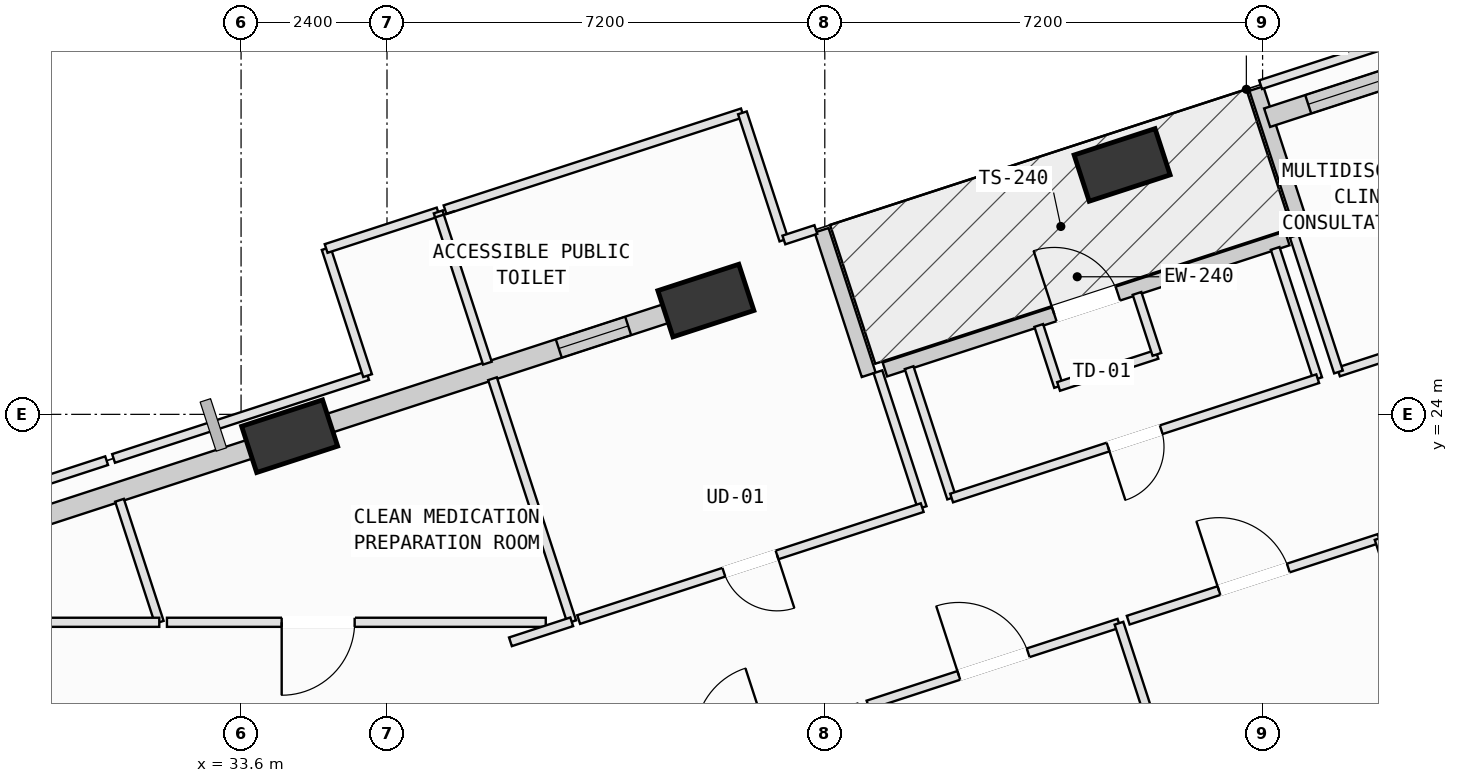
"""IFC4 building model, lengths in metres.
Left out: names, types, materials, properties, quantities, classifications, styles, units other than length and angle.
Written with IfcOpenShell. Run it as: python <this file> out.ifc"""

import sys

from ifc_helpers import new_model, si_unit, direction, frame, frame_2d, origin, origin_2d, place, context, subcontext, project, spatial, rectangle, extrude, element, fill, save


model = new_model("IFC4")
c1 = context("Model", 3, precision=1e-05, world=origin(), true_north=direction((0.0, 1.0)))
c2 = subcontext(c1, "Body", "Model", "MODEL_VIEW")
j1 = project(units=[si_unit("LENGTHUNIT", "METRE"), si_unit("PLANEANGLEUNIT", "RADIAN")], contexts=[c1])
p1 = place(None, origin())
s1 = spatial("IfcSite", under=j1, at=p1, CompositionType="ELEMENT")
p2 = place(p1, origin())
s2 = spatial("IfcBuilding", under=s1, at=p2, CompositionType="ELEMENT")
p3 = place(p2, frame((0.0, 0.0, 100.4)))
s3 = spatial("IfcBuildingStorey", under=s2, at=p3, CompositionType="ELEMENT", Elevation=100.4)
p4 = place(p3, frame((48.09, 28.102, 0.002), z_axis=(-0.014146332364, 0.059817034695, 0.998109114096), x_axis=(-0.854089030519, -0.519778031459, 0.019045365861)))
e1 = element("IfcColumn", 1, at=p4, inside=s3, PredefinedType="COLUMN", context=c2, shape_type="SweptSolid", body=[
    extrude(rectangle(XDim=1.4, YDim=0.8, at=origin_2d()), origin(), (0.0, 0.0, 1.0), 4.004),
])
p5 = place(p3, frame((41.244, 25.871, 0.002), z_axis=(-0.004701608145, 0.03162900025, 0.999488619857), x_axis=(-0.894918501832, -0.446119614033, 0.009907827933)))
e2 = element("IfcColumn", 2, at=p5, inside=s3, PredefinedType="COLUMN", context=c2, shape_type="SweptSolid", body=[
    extrude(rectangle(XDim=1.4, YDim=0.8, at=origin_2d()), origin(), (0.0, 0.0, 1.0), 3.998),
])
p6 = place(p3, frame((34.399, 23.64, 0.002), z_axis=(0.004765023776, 0.003359952663, 0.999983002489), x_axis=(-0.801131940554, 0.598485045893, 0.001806562028)))
e3 = element("IfcColumn", 3, at=p6, inside=s3, PredefinedType="COLUMN", context=c2, shape_type="SweptSolid", body=[
    extrude(rectangle(XDim=1.4, YDim=0.8, at=origin_2d()), origin(), (0.0, 0.0, 1.0), 3.996),
])
p7 = place(p3, frame((44.188, 24.738, 0.0), z_axis=(0.0, 0.0, 1.0), x_axis=(0.950787586952, 0.309843451597, 0.0)))
e4 = element("IfcWall", 4, at=p7, inside=s3, PredefinedType="SOLIDWALL", context=c2, shape_type="SweptSolid", body=[
    extrude(rectangle(XDim=6.96, YDim=0.24, at=frame_2d((3.48, 0.0))), origin(), (0.0, 0.0, 1.0), 2.945),
])
p8 = place(p7, frame((2.93, 0.0, 0.0)))
e5 = element("IfcOpeningElement", 5, at=p8, cuts=e4, PredefinedType="OPENING", context=c2, shape_type="SweptSolid", body=[
    extrude(rectangle(XDim=1.1, YDim=2.15, at=frame_2d((0.55, 1.075))), frame((0.0, 0.13, 0.0), z_axis=(0.0, -1.0, 0.0), x_axis=(1.0, 0.0, 0.0)), (0.0, 0.0, 1.0), 0.26),
])
for number, where, z_axis, x_axis in (
    (6, (43.148, 27.028, 0.0), (0.0, 0.0, 1.0), (0.31, -0.951, 0.0)),
    (7, (51.072, 26.981, 0.0), (0.0, 0.0, 1.0), (-0.31, 0.951, 0.0)),
):
    element("IfcWall", number, at=place(p3, frame(where, z_axis=z_axis, x_axis=x_axis)), inside=s3, PredefinedType="SOLIDWALL", context=c2, shape_type="SweptSolid", body=[
        extrude(rectangle(XDim=2.5, YDim=0.24, at=frame_2d((1.25, 0.0))), origin(), (0.0, 0.0, 1.0), 3.165),
    ])
p9 = place(p3, frame((50.475, 28.879, 0.0), z_axis=(0.0, 0.0, 1.0), x_axis=(0.950788010737, 0.309842151164, 0.0)))
e8 = element("IfcWall", 8, at=p9, inside=s3, PredefinedType="SOLIDWALL", context=c2, shape_type="SweptSolid", body=[
    extrude(rectangle(XDim=3.387, YDim=0.32, at=frame_2d((1.694, 0.0))), origin(), (0.0, 0.0, 1.0), 2.945),
])
p10 = place(p9, frame((0.711, 0.0, 0.75)))
e9 = element("IfcOpeningElement", 9, at=p10, cuts=e8, PredefinedType="OPENING", context=c2, shape_type="SweptSolid", body=[
    extrude(rectangle(XDim=1.8, YDim=2.05, at=frame_2d((0.9, 1.025))), frame((0.0, 0.17, 0.0), z_axis=(0.0, -1.0, 0.0), x_axis=(1.0, 0.0, 0.0)), (0.0, 0.0, 1.0), 0.34),
])
p11 = place(p3, frame((34.881, 23.798, 0.0), z_axis=(0.0, 0.0, 1.0), x_axis=(0.950780703693, 0.309864572813, 0.0)))
e10 = element("IfcWall", 10, at=p11, inside=s3, PredefinedType="SOLIDWALL", context=c2, shape_type="SweptSolid", body=[
    extrude(rectangle(XDim=6.211, YDim=0.32, at=frame_2d((3.105, 0.0))), origin(), (0.0, 0.0, 1.0), 3.165),
])
p12 = place(p11, frame((4.148, 0.0, 0.75)))
e11 = element("IfcOpeningElement", 11, at=p12, cuts=e10, PredefinedType="OPENING", context=c2, shape_type="SweptSolid", body=[
    extrude(rectangle(XDim=1.2, YDim=1.75, at=frame_2d((0.6, 0.875))), frame((0.0, 0.17, 0.0), z_axis=(0.0, -1.0, 0.0), x_axis=(1.0, 0.0, 0.0)), (0.0, 0.0, 1.0), 0.34),
])
p13 = place(p3, frame((28.271, 21.643, 0.0), z_axis=(0.0, 0.0, 1.0), x_axis=(0.950787828702, 0.309842709763, 0.0)))
e12 = element("IfcWall", 12, at=p13, inside=s3, PredefinedType="SOLIDWALL", context=c2, shape_type="SweptSolid", body=[
    extrude(rectangle(XDim=5.96, YDim=0.32, at=frame_2d((2.98, 0.0))), origin(), (0.0, 0.0, 1.0), 3.165),
])
p14 = place(p3, frame((43.911, 19.22, 0.0), z_axis=(0.0, 0.0, 1.0), x_axis=(0.950787843692, 0.309842663762, 0.0)))
e13 = element("IfcWall", 13, at=p14, inside=s3, PredefinedType="PARTITIONING", context=c2, shape_type="SweptSolid", body=[
    extrude(rectangle(XDim=4.341, YDim=0.15, at=frame_2d((2.17, 0.0))), origin(), (0.0, 0.0, 1.0), 3.78),
])
p15 = place(p14, frame((1.57, 0.0, 0.0)))
e14 = element("IfcOpeningElement", 14, at=p15, cuts=e13, PredefinedType="OPENING", context=c2, shape_type="SweptSolid", body=[
    extrude(rectangle(XDim=1.2, YDim=2.15, at=frame_2d((0.6, 1.075))), frame((0.0, 0.085, 0.0), z_axis=(0.0, -1.0, 0.0), x_axis=(1.0, 0.0, 0.0)), (0.0, 0.0, 1.0), 0.17),
])
p16 = place(p3, frame((48.038, 20.565, 0.0), z_axis=(0.0, 0.0, 1.0), x_axis=(0.309813403984, -0.950797378368, 0.0)))
e15 = element("IfcWall", 15, at=p16, inside=s3, PredefinedType="PARTITIONING", context=c2, shape_type="SweptSolid", body=[
    extrude(rectangle(XDim=13.615, YDim=0.15, at=frame_2d((6.807, 0.0))), origin(), (0.0, 0.0, 1.0), 3.78),
])
p17 = place(p3, frame((48.19, 20.615, 0.0), z_axis=(0.0, 0.0, 1.0), x_axis=(0.950827127497, 0.309722090939, 0.0)))
e16 = element("IfcWall", 16, at=p17, inside=s3, PredefinedType="PARTITIONING", context=c2, shape_type="SweptSolid", body=[
    extrude(rectangle(XDim=4.339, YDim=0.15, at=frame_2d((2.17, 0.0))), origin(), (0.0, 0.0, 1.0), 3.78),
])
p18 = place(p17, frame((1.57, 0.0, 0.0)))
e17 = element("IfcOpeningElement", 17, at=p18, cuts=e16, PredefinedType="OPENING", context=c2, shape_type="SweptSolid", body=[
    extrude(rectangle(XDim=1.2, YDim=2.15, at=frame_2d((0.6, 1.075))), frame((0.0, 0.085, 0.0), z_axis=(0.0, -1.0, 0.0), x_axis=(1.0, 0.0, 0.0)), (0.0, 0.0, 1.0), 0.17),
])
p19 = place(p3, frame((52.316, 21.959, 0.0), z_axis=(0.0, 0.0, 1.0), x_axis=(0.309872962478, -0.950777969415, 0.0)))
e18 = element("IfcWall", 18, at=p19, inside=s3, PredefinedType="PARTITIONING", context=c2, shape_type="SweptSolid", body=[
    extrude(rectangle(XDim=13.615, YDim=0.15, at=frame_2d((6.808, 0.0))), origin(), (0.0, 0.0, 1.0), 3.78),
])
p20 = place(p3, frame((28.143, 22.18, 0.0), z_axis=(0.0, 0.0, 1.0), x_axis=(0.950757786867, 0.309934881405, 0.0)))
e19 = element("IfcWall", 19, at=p20, inside=s3, PredefinedType="PARTITIONING", context=c2, shape_type="SweptSolid", body=[
    extrude(rectangle(XDim=3.414, YDim=0.15, at=frame_2d((1.707, 0.0))), origin(), (0.0, 0.0, 1.0), 3.78),
])
p21 = place(p3, frame((31.601, 22.587, 0.0), z_axis=(0.0, 0.0, 1.0), x_axis=(0.309766024329, -0.950812815528, 0.0)))
e20 = element("IfcWall", 20, at=p21, inside=s3, PredefinedType="PARTITIONING", context=c2, shape_type="SweptSolid", body=[
    extrude(rectangle(XDim=2.111, YDim=0.15, at=frame_2d((1.055, 0.0))), origin(), (0.0, 0.0, 1.0), 3.78),
])
p22 = place(p3, frame((32.255, 20.58, 0.0), z_axis=(0.0, 0.0, 1.0), x_axis=(-1.0, 0.0, 0.0)))
e21 = element("IfcWall", 21, at=p22, inside=s3, PredefinedType="PARTITIONING", context=c2, shape_type="SweptSolid", body=[
    extrude(rectangle(XDim=6.659, YDim=0.15, at=frame_2d((3.33, 0.0))), origin(), (0.0, 0.0, 1.0), 3.78),
])
p23 = place(p22, frame((2.524, 0.0, 0.0)))
e22 = element("IfcOpeningElement", 22, at=p23, cuts=e21, PredefinedType="OPENING", context=c2, shape_type="SweptSolid", body=[
    extrude(rectangle(XDim=1.0, YDim=2.12, at=frame_2d((0.5, 1.06))), frame((0.0, 0.085, 0.0), z_axis=(0.0, -1.0, 0.0), x_axis=(1.0, 0.0, 0.0)), (0.0, 0.0, 1.0), 0.17),
])
p24 = place(p3, frame((38.611, 20.58, 0.0), z_axis=(0.0, 0.0, 1.0), x_axis=(-1.0, 0.0, 0.0)))
e23 = element("IfcWall", 23, at=p24, inside=s3, PredefinedType="PARTITIONING", context=c2, shape_type="SweptSolid", body=[
    extrude(rectangle(XDim=6.23, YDim=0.15, at=frame_2d((3.115, 0.0))), origin(), (0.0, 0.0, 1.0), 3.365),
])
p25 = place(p24, frame((3.143, 0.0, 0.0)))
e24 = element("IfcOpeningElement", 24, at=p25, cuts=e23, PredefinedType="OPENING", context=c2, shape_type="SweptSolid", body=[
    extrude(rectangle(XDim=1.2, YDim=2.15, at=frame_2d((0.6, 1.075))), frame((0.0, 0.085, 0.0), z_axis=(0.0, -1.0, 0.0), x_axis=(1.0, 0.0, 0.0)), (0.0, 0.0, 1.0), 0.17),
])
p26 = place(p3, frame((31.503, 23.275, 0.0), z_axis=(0.0, 0.0, 1.0), x_axis=(0.950751552186, 0.30995400629, 0.0)))
e25 = element("IfcWall", 25, at=p26, inside=s3, PredefinedType="PARTITIONING", context=c2, shape_type="SweptSolid", body=[
    extrude(rectangle(XDim=4.394, YDim=0.15, at=frame_2d((2.197, 0.0))), origin(), (0.0, 0.0, 1.0), 3.78),
])
p27 = place(p3, frame((35.681, 24.637, 0.0), z_axis=(0.0, 0.0, 1.0), x_axis=(-0.310027143269, 0.950727705727, 0.0)))
e26 = element("IfcWall", 26, at=p27, inside=s3, PredefinedType="PARTITIONING", context=c2, shape_type="SweptSolid", body=[
    extrude(rectangle(XDim=2.199, YDim=0.15, at=frame_2d((1.1, 0.0))), origin(), (0.0, 0.0, 1.0), 3.78),
])
p28 = place(p3, frame((34.999, 26.728, 0.0), z_axis=(0.0, 0.0, 1.0), x_axis=(0.95066765478, 0.310211234734, 0.0)))
e27 = element("IfcWall", 27, at=p28, inside=s3, PredefinedType="PARTITIONING", context=c2, shape_type="SweptSolid", body=[
    extrude(rectangle(XDim=1.938, YDim=0.15, at=frame_2d((0.969, 0.0))), origin(), (0.0, 0.0, 1.0), 3.78),
])
p29 = place(p3, frame((36.841, 27.329, 0.0), z_axis=(0.0, 0.0, 1.0), x_axis=(0.309611562033, -0.950863124038, 0.0)))
e28 = element("IfcWall", 28, at=p29, inside=s3, PredefinedType="PARTITIONING", context=c2, shape_type="SweptSolid", body=[
    extrude(rectangle(XDim=2.615, YDim=0.15, at=frame_2d((1.308, 0.0))), origin(), (0.0, 0.0, 1.0), 3.78),
])
p30 = place(p3, frame((37.735, 24.586, 0.0), z_axis=(0.0, 0.0, 1.0), x_axis=(0.309863158059, -0.950781164768, 0.0)))
e29 = element("IfcWall", 29, at=p30, inside=s3, PredefinedType="PARTITIONING", context=c2, shape_type="SweptSolid", body=[
    extrude(rectangle(XDim=4.205, YDim=0.15, at=frame_2d((2.103, 0.0))), origin(), (0.0, 0.0, 1.0), 3.78),
])
p31 = place(p3, frame((39.038, 20.588, 0.0), z_axis=(0.0, 0.0, 1.0), x_axis=(-0.950689998209, -0.310142753109, 0.0)))
e30 = element("IfcWall", 30, at=p31, inside=s3, PredefinedType="PARTITIONING", context=c2, shape_type="SweptSolid", body=[
    extrude(rectangle(XDim=1.06, YDim=0.15, at=frame_2d((0.53, 0.0))), origin(), (0.0, 0.0, 1.0), 3.78),
])
p32 = place(p3, frame((44.074, 24.7, 0.0), z_axis=(0.0, 0.0, 1.0), x_axis=(0.309861333994, -0.950781759236, 0.0)))
e31 = element("IfcWall", 31, at=p32, inside=s3, PredefinedType="PARTITIONING", context=c2, shape_type="SweptSolid", body=[
    extrude(rectangle(XDim=2.35, YDim=0.15, at=frame_2d((1.175, 0.0))), origin(), (0.0, 0.0, 1.0), 3.365),
])
p33 = place(p3, frame((44.802, 22.466, 0.0), z_axis=(0.0, 0.0, 1.0), x_axis=(-0.950794053115, -0.309823608787, 0.0)))
e32 = element("IfcWall", 32, at=p33, inside=s3, PredefinedType="PARTITIONING", context=c2, shape_type="SweptSolid", body=[
    extrude(rectangle(XDim=5.942, YDim=0.15, at=frame_2d((2.971, 0.0))), origin(), (0.0, 0.0, 1.0), 2.945),
])
p34 = place(p33, frame((2.511, 0.0, 0.0)))
e33 = element("IfcOpeningElement", 33, at=p34, cuts=e32, PredefinedType="OPENING", context=c2, shape_type="SweptSolid", body=[
    extrude(rectangle(XDim=0.92, YDim=2.1, at=frame_2d((0.46, 1.05))), frame((0.0, 0.085, 0.0), z_axis=(0.0, -1.0, 0.0), x_axis=(1.0, 0.0, 0.0)), (0.0, 0.0, 1.0), 0.17),
])
p35 = place(p3, frame((36.955, 27.366, 0.0), z_axis=(0.0, 0.0, 1.0), x_axis=(0.950816492939, 0.309754736453, 0.0)))
e34 = element("IfcWall", 34, at=p35, inside=s3, PredefinedType="PARTITIONING", context=c2, shape_type="SweptSolid", body=[
    extrude(rectangle(XDim=5.143, YDim=0.15, at=frame_2d((2.571, 0.0))), origin(), (0.0, 0.0, 1.0), 3.78),
])
p36 = place(p3, frame((41.845, 28.959, 0.0), z_axis=(0.0, 0.0, 1.0), x_axis=(0.310127470462, -0.950694983717, 0.0)))
e35 = element("IfcWall", 35, at=p36, inside=s3, PredefinedType="PARTITIONING", context=c2, shape_type="SweptSolid", body=[
    extrude(rectangle(XDim=2.199, YDim=0.15, at=frame_2d((1.1, 0.0))), origin(), (0.0, 0.0, 1.0), 3.78),
])
p37 = place(p3, frame((42.527, 26.868, 0.0), z_axis=(0.0, 0.0, 1.0), x_axis=(0.950390014453, 0.311060798602, 0.0)))
e36 = element("IfcWall", 36, at=p37, inside=s3, PredefinedType="PARTITIONING", context=c2, shape_type="SweptSolid", body=[
    extrude(rectangle(XDim=0.553, YDim=0.15, at=frame_2d((0.277, 0.0))), origin(), (0.0, 0.0, 1.0), 3.145),
])
p38 = place(p3, frame((45.286, 22.624, 0.0), z_axis=(0.0, 0.0, 1.0), x_axis=(-0.3099525252, 0.950752035035, 0.0)))
e37 = element("IfcWall", 37, at=p38, inside=s3, PredefinedType="PARTITIONING", context=c2, shape_type="SweptSolid", body=[
    extrude(rectangle(XDim=2.255, YDim=0.15, at=frame_2d((1.127, 0.0))), origin(), (0.0, 0.0, 1.0), 3.365),
])
p39 = place(p3, frame((46.719, 25.462, 0.0), z_axis=(0.0, 0.0, 1.0), x_axis=(0.309065133023, -0.951040873753, 0.0)))
e38 = element("IfcWall", 38, at=p39, inside=s3, PredefinedType="PARTITIONING", context=c2, shape_type="SweptSolid", body=[
    extrude(rectangle(XDim=1.054, YDim=0.15, at=frame_2d((0.527, 0.0))), origin(), (0.0, 0.0, 1.0), 3.78),
])
p40 = place(p3, frame((47.045, 24.459, 0.0), z_axis=(0.0, 0.0, 1.0), x_axis=(0.950772136808, 0.309890857996, 0.0)))
e39 = element("IfcWall", 39, at=p40, inside=s3, PredefinedType="PARTITIONING", context=c2, shape_type="SweptSolid", body=[
    extrude(rectangle(XDim=1.701, YDim=0.15, at=frame_2d((0.851, 0.0))), origin(), (0.0, 0.0, 1.0), 3.78),
])
p41 = place(p3, frame((48.662, 24.986, 0.0), z_axis=(0.0, 0.0, 1.0), x_axis=(-0.310111547753, 0.950700177738, 0.0)))
e40 = element("IfcWall", 40, at=p41, inside=s3, PredefinedType="PARTITIONING", context=c2, shape_type="SweptSolid", body=[
    extrude(rectangle(XDim=1.055, YDim=0.15, at=frame_2d((0.527, 0.0))), origin(), (0.0, 0.0, 1.0), 3.78),
])
p42 = place(p3, frame((50.607, 26.729, 0.0), z_axis=(0.0, 0.0, 1.0), x_axis=(0.310080188362, -0.950710406373, 0.0)))
e41 = element("IfcWall", 41, at=p42, inside=s3, PredefinedType="PARTITIONING", context=c2, shape_type="SweptSolid", body=[
    extrude(rectangle(XDim=2.254, YDim=0.15, at=frame_2d((1.127, 0.0))), origin(), (0.0, 0.0, 1.0), 3.78),
])
p43 = place(p3, frame((51.306, 24.586, 0.0), z_axis=(0.0, 0.0, 1.0), x_axis=(-0.950782697814, -0.309858454036, 0.0)))
e42 = element("IfcWall", 42, at=p43, inside=s3, PredefinedType="PARTITIONING", context=c2, shape_type="SweptSolid", body=[
    extrude(rectangle(XDim=6.332, YDim=0.15, at=frame_2d((3.166, 0.0))), origin(), (0.0, 0.0, 1.0), 3.78),
])
p44 = place(p43, frame((2.706, 0.0, 0.0)))
e43 = element("IfcOpeningElement", 43, at=p44, cuts=e42, PredefinedType="OPENING", context=c2, shape_type="SweptSolid", body=[
    extrude(rectangle(XDim=0.92, YDim=2.1, at=frame_2d((0.46, 1.05))), frame((0.0, 0.085, 0.0), z_axis=(0.0, -1.0, 0.0), x_axis=(1.0, 0.0, 0.0)), (0.0, 0.0, 1.0), 0.17),
])
p45 = place(p3, frame((55.98, 26.109, 0.0), z_axis=(0.0, 0.0, 1.0), x_axis=(-0.950778581254, -0.309871085178, 0.0)))
e44 = element("IfcWall", 44, at=p45, inside=s3, PredefinedType="PARTITIONING", context=c2, shape_type="SweptSolid", body=[
    extrude(rectangle(XDim=4.556, YDim=0.15, at=frame_2d((2.278, 0.0))), origin(), (0.0, 0.0, 1.0), 3.78),
])
p46 = place(p45, frame((1.678, 0.0, 0.0)))
e45 = element("IfcOpeningElement", 45, at=p46, cuts=e44, PredefinedType="OPENING", context=c2, shape_type="SweptSolid", body=[
    extrude(rectangle(XDim=1.2, YDim=2.15, at=frame_2d((0.6, 1.075))), frame((0.0, 0.085, 0.0), z_axis=(0.0, -1.0, 0.0), x_axis=(1.0, 0.0, 0.0)), (0.0, 0.0, 1.0), 0.17),
])
p47 = place(p3, frame((51.648, 24.697, 0.0), z_axis=(0.0, 0.0, 1.0), x_axis=(-0.309861333994, 0.950781759236, 0.0)))
e46 = element("IfcWall", 46, at=p47, inside=s3, PredefinedType="PARTITIONING", context=c2, shape_type="SweptSolid", body=[
    extrude(rectangle(XDim=2.35, YDim=0.15, at=frame_2d((1.175, 0.0))), origin(), (0.0, 0.0, 1.0), 3.78),
])
p48 = place(p3, frame((50.367, 29.422, 0.0), z_axis=(0.0, 0.0, 1.0), x_axis=(0.950756233323, 0.309939647024, 0.0)))
e47 = element("IfcWall", 47, at=p48, inside=s3, PredefinedType="PARTITIONING", context=c2, shape_type="SweptSolid", body=[
    extrude(rectangle(XDim=4.326, YDim=0.15, at=frame_2d((2.163, 0.0))), origin(), (0.0, 0.0, 1.0), 2.945),
])
p49 = place(p8, origin())
e48 = element("IfcDoor", 48, at=p49, inside=s3, OperationType="SINGLE_SWING_LEFT", PredefinedType="DOOR", context=c2, shape_type="SweptSolid", body=[
    extrude(rectangle(XDim=1.1, YDim=2.15, at=frame_2d((0.55, 1.075))), frame((0.0, 0.025, 0.0), z_axis=(0.0, -1.0, 0.0), x_axis=(1.0, 0.0, 0.0)), (0.0, 0.0, 1.0), 0.05),
])
fill(e5, e48)
p50 = place(p10, origin())
e49 = element("IfcWindow", 49, at=p50, inside=s3, PartitioningType="SINGLE_PANEL", PredefinedType="WINDOW", context=c2, shape_type="SweptSolid", body=[
    extrude(rectangle(XDim=1.8, YDim=2.05, at=frame_2d((0.9, 1.025))), frame((0.0, 0.03, 0.0), z_axis=(0.0, -1.0, 0.0), x_axis=(1.0, 0.0, 0.0)), (0.0, 0.0, 1.0), 0.06),
])
fill(e9, e49)
p51 = place(p12, origin())
e50 = element("IfcWindow", 50, at=p51, inside=s3, PartitioningType="SINGLE_PANEL", PredefinedType="WINDOW", context=c2, shape_type="SweptSolid", body=[
    extrude(rectangle(XDim=1.2, YDim=1.75, at=frame_2d((0.6, 0.875))), frame((0.0, 0.03, 0.0), z_axis=(0.0, -1.0, 0.0), x_axis=(1.0, 0.0, 0.0)), (0.0, 0.0, 1.0), 0.06),
])
fill(e11, e50)
p52 = place(p15, origin())
e51 = element("IfcDoor", 51, at=p52, inside=s3, OperationType="SINGLE_SWING_LEFT", PredefinedType="DOOR", context=c2, shape_type="SweptSolid", body=[
    extrude(rectangle(XDim=1.2, YDim=2.15, at=frame_2d((0.6, 1.075))), frame((0.0, 0.025, 0.0), z_axis=(0.0, -1.0, 0.0), x_axis=(1.0, 0.0, 0.0)), (0.0, 0.0, 1.0), 0.05),
])
fill(e14, e51)
p53 = place(p18, origin())
e52 = element("IfcDoor", 52, at=p53, inside=s3, OperationType="SINGLE_SWING_LEFT", PredefinedType="DOOR", context=c2, shape_type="SweptSolid", body=[
    extrude(rectangle(XDim=1.2, YDim=2.15, at=frame_2d((0.6, 1.075))), frame((0.0, 0.025, 0.0), z_axis=(0.0, -1.0, 0.0), x_axis=(1.0, 0.0, 0.0)), (0.0, 0.0, 1.0), 0.05),
])
fill(e17, e52)
p54 = place(p25, origin())
e53 = element("IfcDoor", 53, at=p54, inside=s3, OperationType="SINGLE_SWING_RIGHT", PredefinedType="DOOR", context=c2, shape_type="SweptSolid", body=[
    extrude(rectangle(XDim=1.2, YDim=2.15, at=frame_2d((0.6, 1.075))), frame((0.0, 0.025, 0.0), z_axis=(0.0, -1.0, 0.0), x_axis=(1.0, 0.0, 0.0)), (0.0, 0.0, 1.0), 0.05),
])
fill(e24, e53)
p55 = place(p34, origin())
e54 = element("IfcDoor", 54, at=p55, inside=s3, OperationType="SINGLE_SWING_LEFT", PredefinedType="DOOR", context=c2, shape_type="SweptSolid", body=[
    extrude(rectangle(XDim=0.92, YDim=2.1, at=frame_2d((0.46, 1.05))), frame((0.0, 0.025, 0.0), z_axis=(0.0, -1.0, 0.0), x_axis=(1.0, 0.0, 0.0)), (0.0, 0.0, 1.0), 0.05),
])
fill(e33, e54)
p56 = place(p44, origin())
e55 = element("IfcDoor", 55, at=p56, inside=s3, OperationType="SINGLE_SWING_RIGHT", PredefinedType="DOOR", context=c2, shape_type="SweptSolid", body=[
    extrude(rectangle(XDim=0.92, YDim=2.1, at=frame_2d((0.46, 1.05))), frame((0.0, 0.025, 0.0), z_axis=(0.0, -1.0, 0.0), x_axis=(1.0, 0.0, 0.0)), (0.0, 0.0, 1.0), 0.05),
])
fill(e43, e55)
save(model, sys.argv[1])
